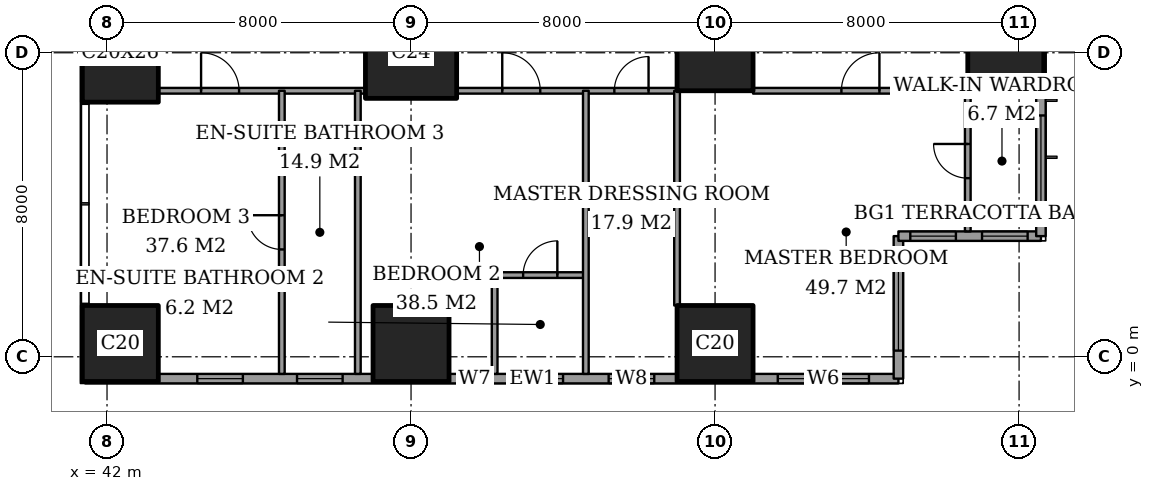
"""IFC4 building model, lengths in metres.
Left out: names, types, materials, properties, quantities, classifications, styles, units other than length and angle.
Written with IfcOpenShell. Run it as: python <this file> out.ifc"""

import sys

from ifc_helpers import new_model, si_unit, direction, frame, frame_2d, origin, origin_2d, place, context, subcontext, project, spatial, rectangle, extrude, element, fill, save


model = new_model("IFC4")
c1 = context("Model", 3, precision=1e-05, world=origin(), true_north=direction((0.0, 1.0)))
c2 = subcontext(c1, "Body", "Model", "MODEL_VIEW")
j1 = project(units=[si_unit("LENGTHUNIT", "METRE"), si_unit("PLANEANGLEUNIT", "RADIAN")], contexts=[c1])
p1 = place(None, origin())
s1 = spatial("IfcSite", under=j1, at=p1, CompositionType="ELEMENT")
p2 = place(p1, origin())
s2 = spatial("IfcBuilding", under=s1, at=p2, CompositionType="ELEMENT")
p3 = place(p2, frame((0.0, 0.0, 72.8)))
s3 = spatial("IfcBuildingStorey", under=s2, at=p3, CompositionType="ELEMENT", Elevation=72.8)
p4 = place(p3, frame((42.35, 0.35, 0.0), z_axis=(0.0, 0.0, 1.0), x_axis=(1.0, 0.0, 0.0)))
e1 = element("IfcColumn", 1, at=p4, inside=s3, PredefinedType="COLUMN", context=c2, shape_type="SweptSolid", body=[
    extrude(rectangle(XDim=2.0, YDim=2.0, at=origin_2d()), origin(), (0.0, 0.0, 1.0), 3.6),
])
p5 = place(p3, frame((42.35, 8.0, 0.0), z_axis=(0.0, 0.0, 1.0), x_axis=(1.0, 0.0, 0.0)))
e2 = element("IfcColumn", 2, at=p5, inside=s3, PredefinedType="COLUMN", context=c2, shape_type="SweptSolid", body=[
    extrude(rectangle(XDim=2.0, YDim=2.6, at=origin_2d()), origin(), (0.0, 0.0, 1.0), 3.6),
])
p6 = place(p3, frame((50.0, 0.35, 0.0), z_axis=(0.0, 0.0, 1.0), x_axis=(1.0, 0.0, 0.0)))
e3 = element("IfcColumn", 3, at=p6, inside=s3, PredefinedType="COLUMN", context=c2, shape_type="SweptSolid", body=[
    extrude(rectangle(XDim=2.0, YDim=2.0, at=origin_2d()), origin(), (0.0, 0.0, 1.0), 3.6),
])
p7 = place(p3, frame((50.0, 8.0, 0.0), z_axis=(0.0, 0.0, 1.0), x_axis=(1.0, 0.0, 0.0)))
e4 = element("IfcColumn", 4, at=p7, inside=s3, PredefinedType="COLUMN", context=c2, shape_type="SweptSolid", body=[
    extrude(rectangle(XDim=2.4, YDim=2.4, at=origin_2d()), origin(), (0.0, 0.0, 1.0), 3.6),
])
for number, where, z_axis, x_axis in (
    (5, (58.0, 0.35, 0.0), (0.0, 0.0, 1.0), (1.0, 0.0, 0.0)),
    (6, (58.0, 8.0, 0.0), (0.0, 0.0, 1.0), (1.0, 0.0, 0.0)),
    (7, (65.65, 8.0, 0.0), (0.0, 0.0, 1.0), (1.0, 0.0, 0.0)),
):
    element("IfcColumn", number, at=place(p3, frame(where, z_axis=z_axis, x_axis=x_axis)), inside=s3, PredefinedType="COLUMN", context=c2, shape_type="SweptSolid", body=[
        extrude(rectangle(XDim=2.0, YDim=2.0, at=origin_2d()), origin(), (0.0, 0.0, 1.0), 3.6),
    ])
p8 = place(p3, frame((41.425, -0.575, 0.0), z_axis=(0.0, 0.0, 1.0), x_axis=(1.0, 0.0, 0.0)))
e8 = element("IfcWall", 8, at=p8, inside=s3, PredefinedType="SOLIDWALL", context=c2, shape_type="SweptSolid", body=[
    extrude(rectangle(XDim=21.4, YDim=0.25, at=frame_2d((10.7, 0.0))), origin(), (0.0, 0.0, 1.0), 3.6),
])
p9 = place(p8, frame((2.95, 0.0, 0.6)))
e9 = element("IfcOpeningElement", 9, at=p9, cuts=e8, PredefinedType="OPENING", context=c2, shape_type="SweptSolid", body=[
    extrude(rectangle(XDim=1.2, YDim=2.0, at=frame_2d((0.6, 1.0))), frame((0.0, 0.135, 0.0), z_axis=(0.0, -1.0, 0.0), x_axis=(1.0, 0.0, 0.0)), (0.0, 0.0, 1.0), 0.27),
])
p10 = place(p8, frame((5.575, 0.0, 0.6)))
e10 = element("IfcOpeningElement", 10, at=p10, cuts=e8, PredefinedType="OPENING", context=c2, shape_type="SweptSolid", body=[
    extrude(rectangle(XDim=1.2, YDim=2.0, at=frame_2d((0.6, 1.0))), frame((0.0, 0.135, 0.0), z_axis=(0.0, -1.0, 0.0), x_axis=(1.0, 0.0, 0.0)), (0.0, 0.0, 1.0), 0.27),
])
p11 = place(p8, frame((9.95, 0.0, 0.6)))
e11 = element("IfcOpeningElement", 11, at=p11, cuts=e8, PredefinedType="OPENING", context=c2, shape_type="SweptSolid", body=[
    extrude(rectangle(XDim=0.6, YDim=2.0, at=frame_2d((0.3, 1.0))), frame((0.0, 0.135, 0.0), z_axis=(0.0, -1.0, 0.0), x_axis=(1.0, 0.0, 0.0)), (0.0, 0.0, 1.0), 0.27),
])
p12 = place(p8, frame((11.375, 0.0, 0.6)))
e12 = element("IfcOpeningElement", 12, at=p12, cuts=e8, PredefinedType="OPENING", context=c2, shape_type="SweptSolid", body=[
    extrude(rectangle(XDim=1.2, YDim=2.0, at=frame_2d((0.6, 1.0))), frame((0.0, 0.135, 0.0), z_axis=(0.0, -1.0, 0.0), x_axis=(1.0, 0.0, 0.0)), (0.0, 0.0, 1.0), 0.27),
])
p13 = place(p8, frame((13.775, 0.0, 0.6)))
e13 = element("IfcOpeningElement", 13, at=p13, cuts=e8, PredefinedType="OPENING", context=c2, shape_type="SweptSolid", body=[
    extrude(rectangle(XDim=1.2, YDim=2.0, at=frame_2d((0.6, 1.0))), frame((0.0, 0.135, 0.0), z_axis=(0.0, -1.0, 0.0), x_axis=(1.0, 0.0, 0.0)), (0.0, 0.0, 1.0), 0.27),
])
p14 = place(p8, frame((18.225, 0.0, 0.6)))
e14 = element("IfcOpeningElement", 14, at=p14, cuts=e8, PredefinedType="OPENING", context=c2, shape_type="SweptSolid", body=[
    extrude(rectangle(XDim=2.4, YDim=2.0, at=frame_2d((1.2, 1.0))), frame((0.0, 0.135, 0.0), z_axis=(0.0, -1.0, 0.0), x_axis=(1.0, 0.0, 0.0)), (0.0, 0.0, 1.0), 0.27),
])
p15 = place(p3, frame((62.825, -0.575, 0.0), z_axis=(0.0, 0.0, 1.0), x_axis=(0.0, 1.0, 0.0)))
e15 = element("IfcWall", 15, at=p15, inside=s3, PredefinedType="SOLIDWALL", context=c2, shape_type="SweptSolid", body=[
    extrude(rectangle(XDim=3.75, YDim=0.25, at=frame_2d((1.875, 0.0))), origin(), (0.0, 0.0, 1.0), 3.6),
])
p16 = place(p15, frame((0.738, 0.0, 0.6)))
e16 = element("IfcOpeningElement", 16, at=p16, cuts=e15, PredefinedType="OPENING", context=c2, shape_type="SweptSolid", body=[
    extrude(rectangle(XDim=2.4, YDim=2.0, at=frame_2d((1.2, 1.0))), frame((0.0, 0.135, 0.0), z_axis=(0.0, -1.0, 0.0), x_axis=(1.0, 0.0, 0.0)), (0.0, 0.0, 1.0), 0.27),
])
p17 = place(p3, frame((62.825, 3.175, 0.0), z_axis=(0.0, 0.0, 1.0), x_axis=(1.0, 0.0, 0.0)))
e17 = element("IfcWall", 17, at=p17, inside=s3, PredefinedType="SOLIDWALL", context=c2, shape_type="SweptSolid", body=[
    extrude(rectangle(XDim=3.75, YDim=0.25, at=frame_2d((1.875, 0.0))), origin(), (0.0, 0.0, 1.0), 3.6),
])
p18 = place(p17, frame((0.312, 0.0, 0.6)))
e18 = element("IfcOpeningElement", 18, at=p18, cuts=e17, PredefinedType="OPENING", context=c2, shape_type="SweptSolid", body=[
    extrude(rectangle(XDim=1.2, YDim=2.0, at=frame_2d((0.6, 1.0))), frame((0.0, 0.135, 0.0), z_axis=(0.0, -1.0, 0.0), x_axis=(1.0, 0.0, 0.0)), (0.0, 0.0, 1.0), 0.27),
])
p19 = place(p17, frame((2.2, 0.0, 0.6)))
e19 = element("IfcOpeningElement", 19, at=p19, cuts=e17, PredefinedType="OPENING", context=c2, shape_type="SweptSolid", body=[
    extrude(rectangle(XDim=1.2, YDim=2.0, at=frame_2d((0.6, 1.0))), frame((0.0, 0.135, 0.0), z_axis=(0.0, -1.0, 0.0), x_axis=(1.0, 0.0, 0.0)), (0.0, 0.0, 1.0), 0.27),
])
p20 = place(p3, frame((66.575, 3.175, 0.0), z_axis=(0.0, 0.0, 1.0), x_axis=(0.0, 1.0, 0.0)))
e20 = element("IfcWall", 20, at=p20, inside=s3, PredefinedType="SOLIDWALL", context=c2, shape_type="SweptSolid", body=[
    extrude(rectangle(XDim=41.65, YDim=0.25, at=frame_2d((20.825, 0.0))), origin(), (0.0, 0.0, 1.0), 3.6),
])
p21 = place(p20, frame((0.775, 0.0, 0.6)))
e21 = element("IfcOpeningElement", 21, at=p21, cuts=e20, PredefinedType="OPENING", context=c2, shape_type="SweptSolid", body=[
    extrude(rectangle(XDim=2.4, YDim=2.0, at=frame_2d((1.2, 1.0))), frame((0.0, 0.135, 0.0), z_axis=(0.0, -1.0, 0.0), x_axis=(1.0, 0.0, 0.0)), (0.0, 0.0, 1.0), 0.27),
])
p22 = place(p20, frame((6.1, 0.0, 0.6)))
e22 = element("IfcOpeningElement", 22, at=p22, cuts=e20, PredefinedType="OPENING", context=c2, shape_type="SweptSolid", body=[
    extrude(rectangle(XDim=1.2, YDim=2.0, at=frame_2d((0.6, 1.0))), frame((0.0, 0.135, 0.0), z_axis=(0.0, -1.0, 0.0), x_axis=(1.0, 0.0, 0.0)), (0.0, 0.0, 1.0), 0.27),
])
p23 = place(p20, frame((8.275, 0.0, 0.6)))
e23 = element("IfcOpeningElement", 23, at=p23, cuts=e20, PredefinedType="OPENING", context=c2, shape_type="SweptSolid", body=[
    extrude(rectangle(XDim=2.4, YDim=2.0, at=frame_2d((1.2, 1.0))), frame((0.0, 0.135, 0.0), z_axis=(0.0, -1.0, 0.0), x_axis=(1.0, 0.0, 0.0)), (0.0, 0.0, 1.0), 0.27),
])
p24 = place(p20, frame((15.775, 0.0, 0.6)))
e24 = element("IfcOpeningElement", 24, at=p24, cuts=e20, PredefinedType="OPENING", context=c2, shape_type="SweptSolid", body=[
    extrude(rectangle(XDim=2.4, YDim=2.0, at=frame_2d((1.2, 1.0))), frame((0.0, 0.135, 0.0), z_axis=(0.0, -1.0, 0.0), x_axis=(1.0, 0.0, 0.0)), (0.0, 0.0, 1.0), 0.27),
])
p25 = place(p20, frame((23.475, 0.0, 0.6)))
e25 = element("IfcOpeningElement", 25, at=p25, cuts=e20, PredefinedType="OPENING", context=c2, shape_type="SweptSolid", body=[
    extrude(rectangle(XDim=2.4, YDim=2.0, at=frame_2d((1.2, 1.0))), frame((0.0, 0.135, 0.0), z_axis=(0.0, -1.0, 0.0), x_axis=(1.0, 0.0, 0.0)), (0.0, 0.0, 1.0), 0.27),
])
p26 = place(p20, frame((30.975, 0.0, 0.6)))
e26 = element("IfcOpeningElement", 26, at=p26, cuts=e20, PredefinedType="OPENING", context=c2, shape_type="SweptSolid", body=[
    extrude(rectangle(XDim=2.4, YDim=2.0, at=frame_2d((1.2, 1.0))), frame((0.0, 0.135, 0.0), z_axis=(0.0, -1.0, 0.0), x_axis=(1.0, 0.0, 0.0)), (0.0, 0.0, 1.0), 0.27),
])
p27 = place(p20, frame((34.5, 0.0, 0.6)))
e27 = element("IfcOpeningElement", 27, at=p27, cuts=e20, PredefinedType="OPENING", context=c2, shape_type="SweptSolid", body=[
    extrude(rectangle(XDim=1.2, YDim=2.0, at=frame_2d((0.6, 1.0))), frame((0.0, 0.135, 0.0), z_axis=(0.0, -1.0, 0.0), x_axis=(1.0, 0.0, 0.0)), (0.0, 0.0, 1.0), 0.27),
])
p28 = place(p20, frame((38.475, 0.0, 0.6)))
e28 = element("IfcOpeningElement", 28, at=p28, cuts=e20, PredefinedType="OPENING", context=c2, shape_type="SweptSolid", body=[
    extrude(rectangle(XDim=2.4, YDim=2.0, at=frame_2d((1.2, 1.0))), frame((0.0, 0.135, 0.0), z_axis=(0.0, -1.0, 0.0), x_axis=(1.0, 0.0, 0.0)), (0.0, 0.0, 1.0), 0.27),
])
p29 = place(p3, frame((52.2, 2.15, 0.0), z_axis=(0.0, 0.0, 1.0), x_axis=(1.0, 0.0, 0.0)))
e29 = element("IfcWall", 29, at=p29, inside=s3, PredefinedType="PARTITIONING", context=c2, shape_type="SweptSolid", body=[
    extrude(rectangle(XDim=2.4, YDim=0.15, at=frame_2d((1.2, 0.0))), origin(), (0.0, 0.0, 1.0), 3.35),
])
p30 = place(p29, frame((0.75, 0.0, 0.0)))
e30 = element("IfcOpeningElement", 30, at=p30, cuts=e29, PredefinedType="OPENING", context=c2, shape_type="SweptSolid", body=[
    extrude(rectangle(XDim=0.9, YDim=2.1, at=frame_2d((0.45, 1.05))), frame((0.0, 0.085, 0.0), z_axis=(0.0, -1.0, 0.0), x_axis=(1.0, 0.0, 0.0)), (0.0, 0.0, 1.0), 0.17),
])
p31 = place(p3, frame((43.35, 7.0, 0.0), z_axis=(0.0, 0.0, 1.0), x_axis=(1.0, 0.0, 0.0)))
e31 = element("IfcWall", 31, at=p31, inside=s3, PredefinedType="PARTITIONING", context=c2, shape_type="SweptSolid", body=[
    extrude(rectangle(XDim=5.45, YDim=0.15, at=frame_2d((2.725, 0.0))), origin(), (0.0, 0.0, 1.0), 3.35),
])
p32 = place(p31, frame((1.125, 0.0, 0.0)))
e32 = element("IfcOpeningElement", 32, at=p32, cuts=e31, PredefinedType="OPENING", context=c2, shape_type="SweptSolid", body=[
    extrude(rectangle(XDim=1.0, YDim=2.1, at=frame_2d((0.5, 1.05))), frame((0.0, 0.085, 0.0), z_axis=(0.0, -1.0, 0.0), x_axis=(1.0, 0.0, 0.0)), (0.0, 0.0, 1.0), 0.17),
])
p33 = place(p3, frame((51.2, 7.0, 0.0), z_axis=(0.0, 0.0, 1.0), x_axis=(1.0, 0.0, 0.0)))
e33 = element("IfcWall", 33, at=p33, inside=s3, PredefinedType="PARTITIONING", context=c2, shape_type="SweptSolid", body=[
    extrude(rectangle(XDim=5.8, YDim=0.15, at=frame_2d((2.9, 0.0))), origin(), (0.0, 0.0, 1.0), 3.35),
])
p34 = place(p33, frame((4.15, 0.0, 0.0)))
e34 = element("IfcOpeningElement", 34, at=p34, cuts=e33, PredefinedType="OPENING", context=c2, shape_type="SweptSolid", body=[
    extrude(rectangle(XDim=0.9, YDim=2.1, at=frame_2d((0.45, 1.05))), frame((0.0, 0.085, 0.0), z_axis=(0.0, -1.0, 0.0), x_axis=(1.0, 0.0, 0.0)), (0.0, 0.0, 1.0), 0.17),
])
p35 = place(p33, frame((1.2, 0.0, 0.0)))
e35 = element("IfcOpeningElement", 35, at=p35, cuts=e33, PredefinedType="OPENING", context=c2, shape_type="SweptSolid", body=[
    extrude(rectangle(XDim=1.0, YDim=2.1, at=frame_2d((0.5, 1.05))), frame((0.0, 0.085, 0.0), z_axis=(0.0, -1.0, 0.0), x_axis=(1.0, 0.0, 0.0)), (0.0, 0.0, 1.0), 0.17),
])
p36 = place(p3, frame((59.0, 7.0, 0.0), z_axis=(0.0, 0.0, 1.0), x_axis=(1.0, 0.0, 0.0)))
e36 = element("IfcWall", 36, at=p36, inside=s3, PredefinedType="PARTITIONING", context=c2, shape_type="SweptSolid", body=[
    extrude(rectangle(XDim=5.65, YDim=0.15, at=frame_2d((2.825, 0.0))), origin(), (0.0, 0.0, 1.0), 3.35),
])
p37 = place(p36, frame((2.325, 0.0, 0.0)))
e37 = element("IfcOpeningElement", 37, at=p37, cuts=e36, PredefinedType="OPENING", context=c2, shape_type="SweptSolid", body=[
    extrude(rectangle(XDim=1.0, YDim=2.1, at=frame_2d((0.5, 1.05))), frame((0.0, 0.085, 0.0), z_axis=(0.0, -1.0, 0.0), x_axis=(1.0, 0.0, 0.0)), (0.0, 0.0, 1.0), 0.17),
])
p38 = place(p3, frame((46.6, -0.45, 0.0), z_axis=(0.0, 0.0, 1.0), x_axis=(0.0, 1.0, 0.0)))
e38 = element("IfcWall", 38, at=p38, inside=s3, PredefinedType="PARTITIONING", context=c2, shape_type="SweptSolid", body=[
    extrude(rectangle(XDim=7.45, YDim=0.15, at=frame_2d((3.725, 0.0))), origin(), (0.0, 0.0, 1.0), 3.35),
])
p39 = place(p38, frame((3.275, 0.0, 0.0)))
e39 = element("IfcOpeningElement", 39, at=p39, cuts=e38, PredefinedType="OPENING", context=c2, shape_type="SweptSolid", body=[
    extrude(rectangle(XDim=0.9, YDim=2.1, at=frame_2d((0.45, 1.05))), frame((0.0, 0.085, 0.0), z_axis=(0.0, -1.0, 0.0), x_axis=(1.0, 0.0, 0.0)), (0.0, 0.0, 1.0), 0.17),
])
p40 = place(p3, frame((48.6, -0.45, 0.0), z_axis=(0.0, 0.0, 1.0), x_axis=(0.0, 1.0, 0.0)))
e40 = element("IfcWall", 40, at=p40, inside=s3, PredefinedType="PARTITIONING", context=c2, shape_type="SweptSolid", body=[
    extrude(rectangle(XDim=7.45, YDim=0.15, at=frame_2d((3.725, 0.0))), origin(), (0.0, 0.0, 1.0), 3.35),
])
p41 = place(p3, frame((52.2, -0.45, 0.0), z_axis=(0.0, 0.0, 1.0), x_axis=(0.0, 1.0, 0.0)))
e41 = element("IfcWall", 41, at=p41, inside=s3, PredefinedType="PARTITIONING", context=c2, shape_type="SweptSolid", body=[
    extrude(rectangle(XDim=2.6, YDim=0.15, at=frame_2d((1.3, 0.0))), origin(), (0.0, 0.0, 1.0), 3.35),
])
p42 = place(p3, frame((54.6, -0.45, 0.0), z_axis=(0.0, 0.0, 1.0), x_axis=(0.0, 1.0, 0.0)))
e42 = element("IfcWall", 42, at=p42, inside=s3, PredefinedType="PARTITIONING", context=c2, shape_type="SweptSolid", body=[
    extrude(rectangle(XDim=7.45, YDim=0.15, at=frame_2d((3.725, 0.0))), origin(), (0.0, 0.0, 1.0), 3.35),
])
p43 = place(p3, frame((57.0, 1.35, 0.0), z_axis=(0.0, 0.0, 1.0), x_axis=(0.0, 1.0, 0.0)))
e43 = element("IfcWall", 43, at=p43, inside=s3, PredefinedType="PARTITIONING", context=c2, shape_type="SweptSolid", body=[
    extrude(rectangle(XDim=5.65, YDim=0.15, at=frame_2d((2.825, 0.0))), origin(), (0.0, 0.0, 1.0), 3.35),
])
p44 = place(p3, frame((64.65, 3.3, 0.0), z_axis=(0.0, 0.0, 1.0), x_axis=(0.0, 1.0, 0.0)))
e44 = element("IfcWall", 44, at=p44, inside=s3, PredefinedType="PARTITIONING", context=c2, shape_type="SweptSolid", body=[
    extrude(rectangle(XDim=3.7, YDim=0.15, at=frame_2d((1.85, 0.0))), origin(), (0.0, 0.0, 1.0), 3.35),
])
p45 = place(p44, frame((1.4, 0.0, 0.0)))
e45 = element("IfcOpeningElement", 45, at=p45, cuts=e44, PredefinedType="OPENING", context=c2, shape_type="SweptSolid", body=[
    extrude(rectangle(XDim=0.9, YDim=2.1, at=frame_2d((0.45, 1.05))), frame((0.0, 0.085, 0.0), z_axis=(0.0, -1.0, 0.0), x_axis=(1.0, 0.0, 0.0)), (0.0, 0.0, 1.0), 0.17),
])
p46 = place(p9, origin())
e46 = element("IfcWindow", 46, at=p46, inside=s3, PartitioningType="SINGLE_PANEL", PredefinedType="WINDOW", context=c2, shape_type="SweptSolid", body=[
    extrude(rectangle(XDim=1.2, YDim=2.0, at=frame_2d((0.6, 1.0))), frame((0.0, 0.03, 0.0), z_axis=(0.0, -1.0, 0.0), x_axis=(1.0, 0.0, 0.0)), (0.0, 0.0, 1.0), 0.06),
])
fill(e9, e46)
p47 = place(p10, origin())
e47 = element("IfcWindow", 47, at=p47, inside=s3, PartitioningType="SINGLE_PANEL", PredefinedType="WINDOW", context=c2, shape_type="SweptSolid", body=[
    extrude(rectangle(XDim=1.2, YDim=2.0, at=frame_2d((0.6, 1.0))), frame((0.0, 0.03, 0.0), z_axis=(0.0, -1.0, 0.0), x_axis=(1.0, 0.0, 0.0)), (0.0, 0.0, 1.0), 0.06),
])
fill(e10, e47)
p48 = place(p11, origin())
e48 = element("IfcWindow", 48, at=p48, inside=s3, PartitioningType="SINGLE_PANEL", PredefinedType="WINDOW", context=c2, shape_type="SweptSolid", body=[
    extrude(rectangle(XDim=0.6, YDim=2.0, at=frame_2d((0.3, 1.0))), frame((0.0, 0.03, 0.0), z_axis=(0.0, -1.0, 0.0), x_axis=(1.0, 0.0, 0.0)), (0.0, 0.0, 1.0), 0.06),
])
fill(e11, e48)
p49 = place(p12, origin())
e49 = element("IfcWindow", 49, at=p49, inside=s3, PartitioningType="SINGLE_PANEL", PredefinedType="WINDOW", context=c2, shape_type="SweptSolid", body=[
    extrude(rectangle(XDim=1.2, YDim=2.0, at=frame_2d((0.6, 1.0))), frame((0.0, 0.03, 0.0), z_axis=(0.0, -1.0, 0.0), x_axis=(1.0, 0.0, 0.0)), (0.0, 0.0, 1.0), 0.06),
])
fill(e12, e49)
p50 = place(p13, origin())
e50 = element("IfcWindow", 50, at=p50, inside=s3, PartitioningType="SINGLE_PANEL", PredefinedType="WINDOW", context=c2, shape_type="SweptSolid", body=[
    extrude(rectangle(XDim=1.2, YDim=2.0, at=frame_2d((0.6, 1.0))), frame((0.0, 0.03, 0.0), z_axis=(0.0, -1.0, 0.0), x_axis=(1.0, 0.0, 0.0)), (0.0, 0.0, 1.0), 0.06),
])
fill(e13, e50)
p51 = place(p14, origin())
e51 = element("IfcWindow", 51, at=p51, inside=s3, PartitioningType="SINGLE_PANEL", PredefinedType="WINDOW", context=c2, shape_type="SweptSolid", body=[
    extrude(rectangle(XDim=2.4, YDim=2.0, at=frame_2d((1.2, 1.0))), frame((0.0, 0.03, 0.0), z_axis=(0.0, -1.0, 0.0), x_axis=(1.0, 0.0, 0.0)), (0.0, 0.0, 1.0), 0.06),
])
fill(e14, e51)
p52 = place(p16, origin())
e52 = element("IfcWindow", 52, at=p52, inside=s3, PartitioningType="SINGLE_PANEL", PredefinedType="WINDOW", context=c2, shape_type="SweptSolid", body=[
    extrude(rectangle(XDim=2.4, YDim=2.0, at=frame_2d((1.2, 1.0))), frame((0.0, 0.03, 0.0), z_axis=(0.0, -1.0, 0.0), x_axis=(1.0, 0.0, 0.0)), (0.0, 0.0, 1.0), 0.06),
])
fill(e16, e52)
p53 = place(p18, origin())
e53 = element("IfcWindow", 53, at=p53, inside=s3, PartitioningType="SINGLE_PANEL", PredefinedType="WINDOW", context=c2, shape_type="SweptSolid", body=[
    extrude(rectangle(XDim=1.2, YDim=2.0, at=frame_2d((0.6, 1.0))), frame((0.0, 0.03, 0.0), z_axis=(0.0, -1.0, 0.0), x_axis=(1.0, 0.0, 0.0)), (0.0, 0.0, 1.0), 0.06),
])
fill(e18, e53)
p54 = place(p19, origin())
e54 = element("IfcWindow", 54, at=p54, inside=s3, PartitioningType="SINGLE_PANEL", PredefinedType="WINDOW", context=c2, shape_type="SweptSolid", body=[
    extrude(rectangle(XDim=1.2, YDim=2.0, at=frame_2d((0.6, 1.0))), frame((0.0, 0.03, 0.0), z_axis=(0.0, -1.0, 0.0), x_axis=(1.0, 0.0, 0.0)), (0.0, 0.0, 1.0), 0.06),
])
fill(e19, e54)
p55 = place(p21, origin())
e55 = element("IfcWindow", 55, at=p55, inside=s3, PartitioningType="SINGLE_PANEL", PredefinedType="WINDOW", context=c2, shape_type="SweptSolid", body=[
    extrude(rectangle(XDim=2.4, YDim=2.0, at=frame_2d((1.2, 1.0))), frame((0.0, 0.03, 0.0), z_axis=(0.0, -1.0, 0.0), x_axis=(1.0, 0.0, 0.0)), (0.0, 0.0, 1.0), 0.06),
])
fill(e21, e55)
p56 = place(p45, origin())
e56 = element("IfcDoor", 56, at=p56, inside=s3, OperationType="SINGLE_SWING_LEFT", PredefinedType="DOOR", context=c2, shape_type="SweptSolid", body=[
    extrude(rectangle(XDim=0.9, YDim=2.1, at=frame_2d((0.45, 1.05))), frame((0.0, 0.025, 0.0), z_axis=(0.0, -1.0, 0.0), x_axis=(1.0, 0.0, 0.0)), (0.0, 0.0, 1.0), 0.05),
])
fill(e45, e56)
p57 = place(p37, origin())
e57 = element("IfcDoor", 57, at=p57, inside=s3, OperationType="SINGLE_SWING_LEFT", PredefinedType="DOOR", context=c2, shape_type="SweptSolid", body=[
    extrude(rectangle(XDim=1.0, YDim=2.1, at=frame_2d((0.5, 1.05))), frame((0.0, 0.025, 0.0), z_axis=(0.0, -1.0, 0.0), x_axis=(1.0, 0.0, 0.0)), (0.0, 0.0, 1.0), 0.05),
])
fill(e37, e57)
p58 = place(p34, origin())
e58 = element("IfcDoor", 58, at=p58, inside=s3, OperationType="SINGLE_SWING_LEFT", PredefinedType="DOOR", context=c2, shape_type="SweptSolid", body=[
    extrude(rectangle(XDim=0.9, YDim=2.1, at=frame_2d((0.45, 1.05))), frame((0.0, 0.025, 0.0), z_axis=(0.0, -1.0, 0.0), x_axis=(1.0, 0.0, 0.0)), (0.0, 0.0, 1.0), 0.05),
])
fill(e34, e58)
p59 = place(p30, origin())
e59 = element("IfcDoor", 59, at=p59, inside=s3, OperationType="SINGLE_SWING_LEFT", PredefinedType="DOOR", context=c2, shape_type="SweptSolid", body=[
    extrude(rectangle(XDim=0.9, YDim=2.1, at=frame_2d((0.45, 1.05))), frame((0.0, 0.025, 0.0), z_axis=(0.0, -1.0, 0.0), x_axis=(1.0, 0.0, 0.0)), (0.0, 0.0, 1.0), 0.05),
])
fill(e30, e59)
p60 = place(p35, origin())
e60 = element("IfcDoor", 60, at=p60, inside=s3, OperationType="SINGLE_SWING_RIGHT", PredefinedType="DOOR", context=c2, shape_type="SweptSolid", body=[
    extrude(rectangle(XDim=1.0, YDim=2.1, at=frame_2d((0.5, 1.05))), frame((0.0, 0.025, 0.0), z_axis=(0.0, -1.0, 0.0), x_axis=(1.0, 0.0, 0.0)), (0.0, 0.0, 1.0), 0.05),
])
fill(e35, e60)
p61 = place(p39, origin())
e61 = element("IfcDoor", 61, at=p61, inside=s3, OperationType="SINGLE_SWING_LEFT", PredefinedType="DOOR", context=c2, shape_type="SweptSolid", body=[
    extrude(rectangle(XDim=0.9, YDim=2.1, at=frame_2d((0.45, 1.05))), frame((0.0, 0.025, 0.0), z_axis=(0.0, -1.0, 0.0), x_axis=(1.0, 0.0, 0.0)), (0.0, 0.0, 1.0), 0.05),
])
fill(e39, e61)
p62 = place(p32, origin())
e62 = element("IfcDoor", 62, at=p62, inside=s3, OperationType="SINGLE_SWING_RIGHT", PredefinedType="DOOR", context=c2, shape_type="SweptSolid", body=[
    extrude(rectangle(XDim=1.0, YDim=2.1, at=frame_2d((0.5, 1.05))), frame((0.0, 0.025, 0.0), z_axis=(0.0, -1.0, 0.0), x_axis=(1.0, 0.0, 0.0)), (0.0, 0.0, 1.0), 0.05),
])
fill(e32, e62)
save(model, sys.argv[1])
